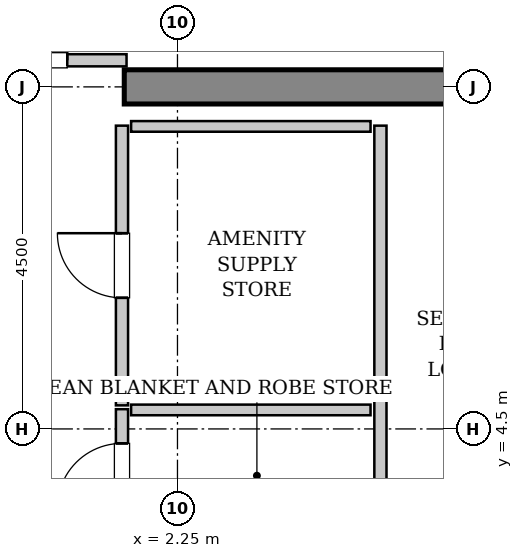
"""IFC4 building model, lengths in metres.
Left out: names, types, materials, properties, quantities, classifications, styles, units other than length and angle.
Written with IfcOpenShell. Run it as: python <this file> out.ifc"""

import sys

from ifc_helpers import new_model, si_unit, direction, frame, frame_2d, origin, place, context, subcontext, project, spatial, rectangle, extrude, source, transform, mapped, element, fill, save


model = new_model("IFC4")
c1 = context("Model", 3, precision=1e-05, world=origin(), true_north=direction((0.0, 1.0)))
c2 = subcontext(c1, "Body", "Model", "MODEL_VIEW")
j1 = project(units=[si_unit("LENGTHUNIT", "METRE"), si_unit("PLANEANGLEUNIT", "RADIAN")], contexts=[c1])
p1 = place(None, origin())
s1 = spatial("IfcSite", under=j1, at=p1, CompositionType="ELEMENT")
p2 = place(p1, origin())
s2 = spatial("IfcBuilding", under=s1, at=p2, CompositionType="ELEMENT")
p3 = place(p2, frame((0.0, 0.0, 248.4)))
s3 = spatial("IfcBuildingStorey", under=s2, at=p3, CompositionType="ELEMENT", Elevation=248.4)
m1 = source(origin(), c2, "Body", "SweptSolid", [
    extrude(rectangle(XDim=9.925, YDim=0.45, at=frame_2d((4.962, 0.0))), origin(), (0.0, 0.0, 1.0), 3.8),
])
p4 = place(p3, frame((1.55, 9.0, 0.0), z_axis=(0.0, 0.0, 1.0), x_axis=(1.0, 0.0, 0.0)))
e1 = element("IfcWall", 1, at=p4, inside=s3, PredefinedType="SHEAR", context=c2, shape_type="MappedRepresentation", body=[
    mapped(m1, transform((0.0, 0.0, 0.0), x_axis=(1.0, 0.0, 0.0), y_axis=(0.0, 1.0, 0.0), z_axis=(0.0, 0.0, 1.0), scale=1.0)),
])
m2 = source(origin(), c2, "Body", "SweptSolid", [
    extrude(rectangle(XDim=3.16, YDim=0.16, at=frame_2d((1.58, 0.0))), origin(), (0.0, 0.0, 1.0), 2.625),
])
p5 = place(p3, frame((-1.58, 9.35, 0.0), z_axis=(0.0, 0.0, 1.0), x_axis=(1.0, 0.0, 0.0)))
e2 = element("IfcWall", 2, at=p5, inside=s3, PredefinedType="PARTITIONING", context=c2, shape_type="MappedRepresentation", body=[
    mapped(m2, transform((0.0, 0.0, 0.0), x_axis=(1.0, 0.0, 0.0), y_axis=(0.0, 1.0, 0.0), z_axis=(0.0, 0.0, 1.0), scale=1.0)),
])
p6 = place(p5, frame((0.78, 0.0, 0.0)))
e3 = element("IfcOpeningElement", 3, at=p6, cuts=e2, PredefinedType="OPENING", context=c2, shape_type="SweptSolid", body=[
    extrude(rectangle(XDim=1.6, YDim=2.3, at=frame_2d((0.8, 1.15))), frame((0.0, 0.09, 0.0), z_axis=(0.0, -1.0, 0.0), x_axis=(1.0, 0.0, 0.0)), (0.0, 0.0, 1.0), 0.18),
])
m3 = source(origin(), c2, "Body", "SweptSolid", [
    extrude(rectangle(XDim=5.45, YDim=0.16, at=frame_2d((2.725, 0.0))), origin(), (0.0, 0.0, 1.0), 3.535),
])
p7 = place(p3, frame((4.92, 3.04, 0.0), z_axis=(0.0, 0.0, 1.0), x_axis=(0.0, 1.0, 0.0)))
e4 = element("IfcWall", 4, at=p7, inside=s3, PredefinedType="PARTITIONING", context=c2, shape_type="MappedRepresentation", body=[
    mapped(m3, transform((0.0, 0.0, 0.0), x_axis=(1.0, 0.0, 0.0), y_axis=(0.0, 1.0, 0.0), z_axis=(0.0, 0.0, 1.0), scale=1.0)),
])
m4 = source(origin(), c2, "Body", "SweptSolid", [
    extrude(rectangle(XDim=1.75, YDim=0.16, at=frame_2d((0.875, 0.0))), origin(), (0.0, 0.0, 1.0), 3.535),
])
p8 = place(p3, frame((1.52, 3.01, 0.0), z_axis=(0.0, 0.0, 1.0), x_axis=(0.0, 1.0, 0.0)))
e5 = element("IfcWall", 5, at=p8, inside=s3, PredefinedType="PARTITIONING", context=c2, shape_type="MappedRepresentation", body=[
    mapped(m4, transform((0.0, 0.0, 0.0), x_axis=(1.0, 0.0, 0.0), y_axis=(0.0, 1.0, 0.0), z_axis=(0.0, 0.0, 1.0), scale=1.0)),
])
p9 = place(p8, frame((0.45, 0.0, 0.0)))
e6 = element("IfcOpeningElement", 6, at=p9, cuts=e5, PredefinedType="OPENING", context=c2, shape_type="SweptSolid", body=[
    extrude(rectangle(XDim=0.85, YDim=2.1, at=frame_2d((0.425, 1.05))), frame((0.0, 0.09, 0.0), z_axis=(0.0, -1.0, 0.0), x_axis=(1.0, 0.0, 0.0)), (0.0, 0.0, 1.0), 0.18),
])
m5 = source(origin(), c2, "Body", "SweptSolid", [
    extrude(rectangle(XDim=3.15, YDim=0.14, at=frame_2d((1.575, 0.0))), origin(), (0.0, 0.0, 1.0), 3.535),
])
p10 = place(p3, frame((1.64, 4.75, 0.0), z_axis=(0.0, 0.0, 1.0), x_axis=(1.0, 0.0, 0.0)))
e7 = element("IfcWall", 7, at=p10, inside=s3, PredefinedType="PARTITIONING", context=c2, shape_type="MappedRepresentation", body=[
    mapped(m5, transform((0.0, 0.0, 0.0), x_axis=(1.0, 0.0, 0.0), y_axis=(0.0, 1.0, 0.0), z_axis=(0.0, 0.0, 1.0), scale=1.0)),
])
m6 = source(origin(), c2, "Body", "SweptSolid", [
    extrude(rectangle(XDim=3.68, YDim=0.16, at=frame_2d((1.84, 0.0))), origin(), (0.0, 0.0, 1.0), 3.535),
])
p11 = place(p3, frame((1.52, 4.81, 0.0), z_axis=(0.0, 0.0, 1.0), x_axis=(0.0, 1.0, 0.0)))
e8 = element("IfcWall", 8, at=p11, inside=s3, PredefinedType="PARTITIONING", context=c2, shape_type="MappedRepresentation", body=[
    mapped(m6, transform((0.0, 0.0, 0.0), x_axis=(1.0, 0.0, 0.0), y_axis=(0.0, 1.0, 0.0), z_axis=(0.0, 0.0, 1.0), scale=1.0)),
])
p12 = place(p11, frame((1.415, 0.0, 0.0)))
e9 = element("IfcOpeningElement", 9, at=p12, cuts=e8, PredefinedType="OPENING", context=c2, shape_type="SweptSolid", body=[
    extrude(rectangle(XDim=0.85, YDim=2.1, at=frame_2d((0.425, 1.05))), frame((0.0, 0.09, 0.0), z_axis=(0.0, -1.0, 0.0), x_axis=(1.0, 0.0, 0.0)), (0.0, 0.0, 1.0), 0.18),
])
p13 = place(p3, frame((1.64, 8.48, 0.0), z_axis=(0.0, 0.0, 1.0), x_axis=(1.0, 0.0, 0.0)))
e10 = element("IfcWall", 10, at=p13, inside=s3, PredefinedType="PARTITIONING", context=c2, shape_type="MappedRepresentation", body=[
    mapped(m5, transform((0.0, 0.0, 0.0), x_axis=(1.0, 0.0, 0.0), y_axis=(0.0, 1.0, 0.0), z_axis=(0.0, 0.0, 1.0), scale=1.0)),
])
m7 = source(origin(), c2, "Body", "SweptSolid", [
    extrude(rectangle(XDim=1.6, YDim=2.3, at=frame_2d((0.8, 1.15))), frame((0.0, 0.025, 0.0), z_axis=(0.0, -1.0, 0.0), x_axis=(1.0, 0.0, 0.0)), (0.0, 0.0, 1.0), 0.05),
])
p14 = place(p6, origin())
e11 = element("IfcDoor", 11, at=p14, inside=s3, OperationType="DOUBLE_DOOR_SINGLE_SWING", PredefinedType="DOOR", context=c2, shape_type="MappedRepresentation", body=[
    mapped(m7, transform((0.0, 0.0, 0.0), x_axis=(1.0, 0.0, 0.0), y_axis=(0.0, 1.0, 0.0), z_axis=(0.0, 0.0, 1.0), scale=1.0)),
])
fill(e3, e11)
m8 = source(origin(), c2, "Body", "SweptSolid", [
    extrude(rectangle(XDim=0.85, YDim=2.1, at=frame_2d((0.425, 1.05))), frame((0.0, 0.025, 0.0), z_axis=(0.0, -1.0, 0.0), x_axis=(1.0, 0.0, 0.0)), (0.0, 0.0, 1.0), 0.05),
])
p15 = place(p9, origin())
e12 = element("IfcDoor", 12, at=p15, inside=s3, OperationType="SINGLE_SWING_LEFT", PredefinedType="DOOR", context=c2, shape_type="MappedRepresentation", body=[
    mapped(m8, transform((0.0, 0.0, 0.0), x_axis=(1.0, 0.0, 0.0), y_axis=(0.0, 1.0, 0.0), z_axis=(0.0, 0.0, 1.0), scale=1.0)),
])
fill(e6, e12)
p16 = place(p12, origin())
e13 = element("IfcDoor", 13, at=p16, inside=s3, OperationType="SINGLE_SWING_RIGHT", PredefinedType="DOOR", context=c2, shape_type="MappedRepresentation", body=[
    mapped(m8, transform((0.0, 0.0, 0.0), x_axis=(1.0, 0.0, 0.0), y_axis=(0.0, 1.0, 0.0), z_axis=(0.0, 0.0, 1.0), scale=1.0)),
])
fill(e9, e13)
save(model, sys.argv[1])
